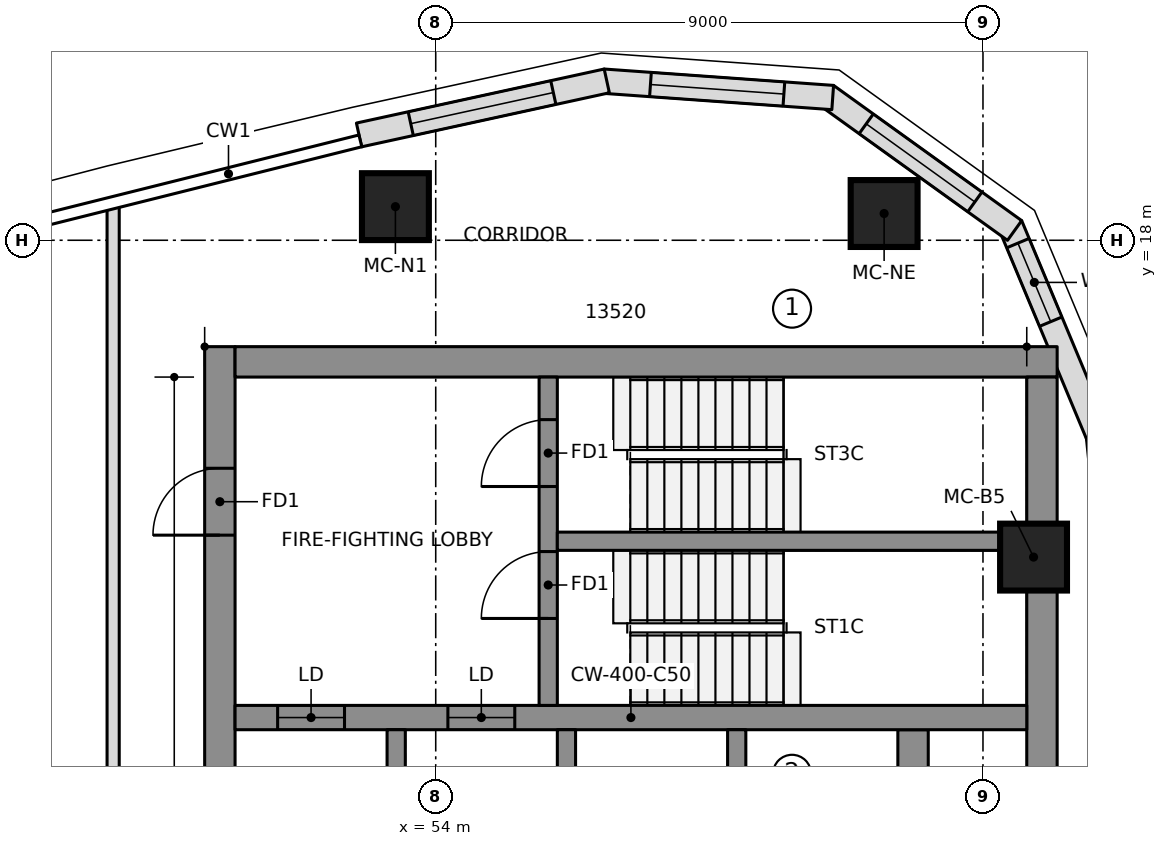
"""IFC4 building model, lengths in metres.
Left out: names, types, materials, properties, quantities, classifications, styles, units other than length and angle.
Written with IfcOpenShell. Run it as: python <this file> out.ifc"""

import sys

from ifc_helpers import new_model, si_unit, direction, frame, frame_2d, origin, origin_2d, place, context, subcontext, project, spatial, polyline, rectangle, outline, extrude, element, fill, save


model = new_model("IFC4")
c1 = context("Model", 3, precision=1e-05, world=origin(), true_north=direction((0.0, 1.0)))
c2 = subcontext(c1, "Body", "Model", "MODEL_VIEW")
j1 = project(units=[si_unit("LENGTHUNIT", "METRE"), si_unit("PLANEANGLEUNIT", "RADIAN")], contexts=[c1])
p1 = place(None, origin())
s1 = spatial("IfcSite", under=j1, at=p1, CompositionType="ELEMENT")
p2 = place(p1, origin())
s2 = spatial("IfcBuilding", under=s1, at=p2, CompositionType="ELEMENT")
p3 = place(p2, frame((0.0, 0.0, 275.0)))
s3 = spatial("IfcBuildingStorey", under=s2, at=p3, CompositionType="ELEMENT", Elevation=275.0)
p4 = place(p3, frame((50.45, 6.65, 0.0), z_axis=(0.0, 0.0, 1.0), x_axis=(0.0, 1.0, 0.0)))
e1 = element("IfcWall", 1, at=p4, inside=s3, PredefinedType="SHEAR", context=c2, shape_type="SweptSolid", body=[
    extrude(rectangle(XDim=9.6, YDim=0.5, at=frame_2d((4.8, 0.0))), origin(), (0.0, 0.0, 1.0), 3.55),
])
p5 = place(p4, frame((6.5, 0.0, 0.0)))
e2 = element("IfcOpeningElement", 2, at=p5, cuts=e1, PredefinedType="OPENING", context=c2, shape_type="SweptSolid", body=[
    extrude(rectangle(XDim=1.1, YDim=2.1, at=frame_2d((0.55, 1.05))), frame((0.0, 0.26, 0.0), z_axis=(0.0, -1.0, 0.0), x_axis=(1.0, 0.0, 0.0)), (0.0, 0.0, 1.0), 0.52),
])
p6 = place(p3, frame((50.7, 16.0, 0.0), z_axis=(0.0, 0.0, 1.0), x_axis=(1.0, 0.0, 0.0)))
e3 = element("IfcWall", 3, at=p6, inside=s3, PredefinedType="SHEAR", context=c2, shape_type="SweptSolid", body=[
    extrude(rectangle(XDim=13.52, YDim=0.5, at=frame_2d((6.76, 0.0))), origin(), (0.0, 0.0, 1.0), 3.55),
])
p7 = place(p3, frame((63.97, 6.903, 0.0), z_axis=(0.0, 0.0, 1.0), x_axis=(0.0, 1.0, 0.0)))
e4 = element("IfcWall", 4, at=p7, inside=s3, PredefinedType="SHEAR", context=c2, shape_type="SweptSolid", body=[
    extrude(rectangle(XDim=8.847, YDim=0.5, at=frame_2d((4.423, 0.0))), origin(), (0.0, 0.0, 1.0), 3.55),
])
p8 = place(p3, frame((61.85, -9.95, 0.0), z_axis=(0.0, 0.0, 1.0), x_axis=(0.0, 1.0, 0.0)))
e5 = element("IfcWall", 5, at=p8, inside=s3, PredefinedType="SHEAR", context=c2, shape_type="SweptSolid", body=[
    extrude(rectangle(XDim=19.9, YDim=0.5, at=frame_2d((9.95, 0.0))), origin(), (0.0, 0.0, 1.0), 3.55),
])
p9 = place(p3, frame((50.7, 10.15, 0.0), z_axis=(0.0, 0.0, 1.0), x_axis=(1.0, 0.0, 0.0)))
e6 = element("IfcWall", 6, at=p9, inside=s3, PredefinedType="SHEAR", context=c2, shape_type="SweptSolid", body=[
    extrude(rectangle(XDim=13.02, YDim=0.4, at=frame_2d((6.51, 0.0))), origin(), (0.0, 0.0, 1.0), 3.55),
])
p10 = place(p9, frame((0.7, 0.0, 0.0)))
e7 = element("IfcOpeningElement", 7, at=p10, cuts=e6, PredefinedType="OPENING", context=c2, shape_type="SweptSolid", body=[
    extrude(rectangle(XDim=1.1, YDim=2.1, at=frame_2d((0.55, 1.05))), frame((0.0, 0.21, 0.0), z_axis=(0.0, -1.0, 0.0), x_axis=(1.0, 0.0, 0.0)), (0.0, 0.0, 1.0), 0.42),
])
p11 = place(p9, frame((3.5, 0.0, 0.0)))
e8 = element("IfcOpeningElement", 8, at=p11, cuts=e6, PredefinedType="OPENING", context=c2, shape_type="SweptSolid", body=[
    extrude(rectangle(XDim=1.1, YDim=2.1, at=frame_2d((0.55, 1.05))), frame((0.0, 0.21, 0.0), z_axis=(0.0, -1.0, 0.0), x_axis=(1.0, 0.0, 0.0)), (0.0, 0.0, 1.0), 0.42),
])
for number, where, z_axis, x_axis in (
    (9, (53.35, 6.95, 0.0), (0.0, 0.0, 1.0), (0.0, 1.0, 0.0)),
    (10, (56.15, 6.95, 0.0), (0.0, 0.0, 1.0), (0.0, 1.0, 0.0)),
    (11, (58.95, 6.95, 0.0), (0.0, 0.0, 1.0), (0.0, 1.0, 0.0)),
):
    element("IfcWall", number, at=place(p3, frame(where, z_axis=z_axis, x_axis=x_axis)), inside=s3, PredefinedType="SHEAR", context=c2, shape_type="SweptSolid", body=[
        extrude(rectangle(XDim=3.0, YDim=0.3, at=frame_2d((1.5, 0.0))), origin(), (0.0, 0.0, 1.0), 3.55),
    ])
p12 = place(p3, frame((55.85, 10.35, 0.0), z_axis=(0.0, 0.0, 1.0), x_axis=(0.0, 1.0, 0.0)))
e12 = element("IfcWall", 12, at=p12, inside=s3, PredefinedType="SHEAR", context=c2, shape_type="SweptSolid", body=[
    extrude(rectangle(XDim=5.4, YDim=0.3, at=frame_2d((2.7, 0.0))), origin(), (0.0, 0.0, 1.0), 3.55),
])
p13 = place(p12, frame((1.43, 0.0, 0.0)))
e13 = element("IfcOpeningElement", 13, at=p13, cuts=e12, PredefinedType="OPENING", context=c2, shape_type="SweptSolid", body=[
    extrude(rectangle(XDim=1.1, YDim=2.1, at=frame_2d((0.55, 1.05))), frame((0.0, 0.16, 0.0), z_axis=(0.0, -1.0, 0.0), x_axis=(1.0, 0.0, 0.0)), (0.0, 0.0, 1.0), 0.32),
])
p14 = place(p12, frame((3.6, 0.0, 0.0)))
e14 = element("IfcOpeningElement", 14, at=p14, cuts=e12, PredefinedType="OPENING", context=c2, shape_type="SweptSolid", body=[
    extrude(rectangle(XDim=1.1, YDim=2.1, at=frame_2d((0.55, 1.05))), frame((0.0, 0.16, 0.0), z_axis=(0.0, -1.0, 0.0), x_axis=(1.0, 0.0, 0.0)), (0.0, 0.0, 1.0), 0.32),
])
p15 = place(p3, frame((56.0, 13.05, 0.0), z_axis=(0.0, 0.0, 1.0), x_axis=(1.0, 0.0, 0.0)))
e15 = element("IfcWall", 15, at=p15, inside=s3, PredefinedType="SHEAR", context=c2, shape_type="SweptSolid", body=[
    extrude(rectangle(XDim=7.72, YDim=0.3, at=frame_2d((3.86, 0.0))), origin(), (0.0, 0.0, 1.0), 3.55),
])
for number, where, z_axis, x_axis in (
    (16, (63.832, 12.789, 0.0), (0.0, 0.0, 1.0), (1.0, 0.0, 0.0)),
    (17, (61.374, 18.44, 0.0), (0.0, 0.0, 1.0), (1.0, 0.0, 0.0)),
    (18, (53.337, 18.553, 0.0), (0.0, 0.0, 1.0), (1.0, 0.0, 0.0)),
):
    element("IfcColumn", number, at=place(p3, frame(where, z_axis=z_axis, x_axis=x_axis)), inside=s3, PredefinedType="COLUMN", context=c2, shape_type="SweptSolid", body=[
        extrude(rectangle(XDim=1.1, YDim=1.1, at=origin_2d()), origin(), (0.0, 0.0, 1.0), 3.55),
    ])
p16 = place(p3, frame((65.331, 10.571, 0.0), z_axis=(0.0, 0.0, 1.0), x_axis=(-0.102249826987, 0.994758751096, 0.0)))
e19 = element("IfcWall", 19, at=p16, inside=s3, PredefinedType="NOTDEFINED", context=c2, shape_type="SweptSolid", body=[
    extrude(outline(polyline([(-0.003, -0.2), (4.263, -0.2), (4.204, 0.2), (0.003, 0.2), (-0.003, -0.2)])), origin(), (0.0, 0.0, 1.0), 3.25),
])
p17 = place(p16, frame((0.417, 0.0, 0.5)))
e20 = element("IfcOpeningElement", 20, at=p17, cuts=e19, PredefinedType="OPENING", context=c2, shape_type="SweptSolid", body=[
    extrude(rectangle(XDim=2.4, YDim=2.0, at=frame_2d((1.2, 1.0))), frame((0.0, 0.21, 0.0), z_axis=(0.0, -1.0, 0.0), x_axis=(1.0, 0.0, 0.0)), (0.0, 0.0, 1.0), 0.42),
])
p18 = place(p3, frame((64.898, 14.782, 0.0), z_axis=(0.0, 0.0, 1.0), x_axis=(-0.385285857918, 0.922797273343, 0.0)))
e21 = element("IfcWall", 21, at=p18, inside=s3, PredefinedType="NOTDEFINED", context=c2, shape_type="SweptSolid", body=[
    extrude(outline(polyline([(-0.03, -0.2), (3.753, -0.2), (3.64, 0.2), (0.03, 0.2), (-0.03, -0.2)])), origin(), (0.0, 0.0, 1.0), 3.25),
])
p19 = place(p18, frame((2.035, 0.0, 0.6)))
e22 = element("IfcOpeningElement", 22, at=p19, cuts=e21, PredefinedType="OPENING", context=c2, shape_type="SweptSolid", body=[
    extrude(outline(polyline([(0.0, 1.75), (0.053, 2.018), (0.205, 2.245), (0.432, 2.397), (0.7, 2.45), (0.968, 2.397), (1.195, 2.245), (1.347, 2.018), (1.4, 1.75), (1.4, 0.7), (1.347, 0.432), (1.195, 0.205), (0.968, 0.053), (0.7, 0.0), (0.432, 0.053), (0.205, 0.205), (0.053, 0.432), (0.0, 0.7), (0.0, 1.75)])), frame((0.0, 0.21, 0.0), z_axis=(0.0, -1.0, 0.0), x_axis=(1.0, 0.0, 0.0)), (0.0, 0.0, 1.0), 0.42),
])
p20 = place(p3, frame((63.474, 18.194, 0.0), z_axis=(0.0, 0.0, 1.0), x_axis=(-0.811962548682, 0.583709533533, 0.0)))
e23 = element("IfcWall", 23, at=p20, inside=s3, PredefinedType="NOTDEFINED", context=c2, shape_type="SweptSolid", body=[
    extrude(outline(polyline([(-0.057, -0.2), (3.753, -0.2), (3.64, 0.2), (0.057, 0.2), (-0.057, -0.2)])), origin(), (0.0, 0.0, 1.0), 3.25),
])
p21 = place(p20, frame((0.748, 0.0, 0.6)))
e24 = element("IfcOpeningElement", 24, at=p21, cuts=e23, PredefinedType="OPENING", context=c2, shape_type="SweptSolid", body=[
    extrude(outline(polyline([(0.0, 1.35), (0.084, 1.771), (0.322, 2.128), (0.679, 2.366), (1.1, 2.45), (1.521, 2.366), (1.878, 2.128), (2.116, 1.771), (2.2, 1.35), (2.2, 1.1), (2.116, 0.679), (1.878, 0.322), (1.521, 0.084), (1.1, 0.0), (0.679, 0.084), (0.322, 0.322), (0.084, 0.679), (0.0, 1.1), (0.0, 1.35)])), frame((0.0, 0.21, 0.0), z_axis=(0.0, -1.0, 0.0), x_axis=(1.0, 0.0, 0.0)), (0.0, 0.0, 1.0), 0.42),
])
p22 = place(p3, frame((60.472, 20.352, 0.0), z_axis=(0.0, 0.0, 1.0), x_axis=(-0.99746272096, 0.071190731806, 0.0)))
e25 = element("IfcWall", 25, at=p22, inside=s3, PredefinedType="NOTDEFINED", context=c2, shape_type="SweptSolid", body=[
    extrude(outline(polyline([(-0.057, -0.2), (3.726, -0.2), (3.668, 0.2), (0.057, 0.2), (-0.057, -0.2)])), origin(), (0.0, 0.0, 1.0), 3.25),
])
p23 = place(p22, frame((0.748, 0.0, 0.6)))
e26 = element("IfcOpeningElement", 26, at=p23, cuts=e25, PredefinedType="OPENING", context=c2, shape_type="SweptSolid", body=[
    extrude(outline(polyline([(0.0, 1.35), (0.084, 1.771), (0.322, 2.128), (0.679, 2.366), (1.1, 2.45), (1.521, 2.366), (1.878, 2.128), (2.116, 1.771), (2.2, 1.35), (2.2, 1.1), (2.116, 0.679), (1.878, 0.322), (1.521, 0.084), (1.1, 0.0), (0.679, 0.084), (0.322, 0.322), (0.084, 0.679), (0.0, 1.1), (0.0, 1.35)])), frame((0.0, 0.21, 0.0), z_axis=(0.0, -1.0, 0.0), x_axis=(1.0, 0.0, 0.0)), (0.0, 0.0, 1.0), 0.42),
])
p24 = place(p3, frame((56.785, 20.615, 0.0), z_axis=(0.0, 0.0, 1.0), x_axis=(-0.977020225348, -0.213146614471, 0.0)))
e27 = element("IfcWall", 27, at=p24, inside=s3, PredefinedType="NOTDEFINED", context=c2, shape_type="SweptSolid", body=[
    extrude(outline(polyline([(-0.029, -0.2), (4.142, -0.2), (4.142, 0.2), (0.029, 0.2), (-0.029, -0.2)])), origin(), (0.0, 0.0, 1.0), 3.25),
])
p25 = place(p24, frame((0.871, 0.0, 0.5)))
e28 = element("IfcOpeningElement", 28, at=p25, cuts=e27, PredefinedType="OPENING", context=c2, shape_type="SweptSolid", body=[
    extrude(rectangle(XDim=2.4, YDim=2.0, at=frame_2d((1.2, 1.0))), frame((0.0, 0.21, 0.0), z_axis=(0.0, -1.0, 0.0), x_axis=(1.0, 0.0, 0.0)), (0.0, 0.0, 1.0), 0.42),
])
p26 = place(p3, frame((48.695, 18.553, 0.0), z_axis=(0.0, 0.0, 1.0), x_axis=(0.0, -1.0, 0.0)))
e29 = element("IfcWall", 29, at=p26, inside=s3, PredefinedType="PARTITIONING", context=c2, shape_type="SweptSolid", body=[
    extrude(rectangle(XDim=9.997, YDim=0.2, at=frame_2d((4.998, 0.0))), origin(), (0.0, 0.0, 1.0), 3.25),
])
p27 = place(p19, origin())
e30 = element("IfcWindow", 30, at=p27, inside=s3, PartitioningType="SINGLE_PANEL", PredefinedType="WINDOW", context=c2, shape_type="SweptSolid", body=[
    extrude(outline(polyline([(0.0, 1.75), (0.053, 2.018), (0.205, 2.245), (0.432, 2.397), (0.7, 2.45), (0.968, 2.397), (1.195, 2.245), (1.347, 2.018), (1.4, 1.75), (1.4, 0.7), (1.347, 0.432), (1.195, 0.205), (0.968, 0.053), (0.7, 0.0), (0.432, 0.053), (0.205, 0.205), (0.053, 0.432), (0.0, 0.7), (0.0, 1.75)])), frame((0.0, 0.17, 0.0), z_axis=(0.0, -1.0, 0.0), x_axis=(1.0, 0.0, 0.0)), (0.0, 0.0, 1.0), 0.06),
])
fill(e22, e30)
p28 = place(p21, origin())
e31 = element("IfcWindow", 31, at=p28, inside=s3, PartitioningType="SINGLE_PANEL", PredefinedType="WINDOW", context=c2, shape_type="SweptSolid", body=[
    extrude(outline(polyline([(0.0, 1.35), (0.084, 1.771), (0.322, 2.128), (0.679, 2.366), (1.1, 2.45), (1.521, 2.366), (1.878, 2.128), (2.116, 1.771), (2.2, 1.35), (2.2, 1.1), (2.116, 0.679), (1.878, 0.322), (1.521, 0.084), (1.1, 0.0), (0.679, 0.084), (0.322, 0.322), (0.084, 0.679), (0.0, 1.1), (0.0, 1.35)])), frame((0.0, 0.17, 0.0), z_axis=(0.0, -1.0, 0.0), x_axis=(1.0, 0.0, 0.0)), (0.0, 0.0, 1.0), 0.06),
])
fill(e24, e31)
p29 = place(p23, origin())
e32 = element("IfcWindow", 32, at=p29, inside=s3, PartitioningType="SINGLE_PANEL", PredefinedType="WINDOW", context=c2, shape_type="SweptSolid", body=[
    extrude(outline(polyline([(0.0, 1.35), (0.084, 1.771), (0.322, 2.128), (0.679, 2.366), (1.1, 2.45), (1.521, 2.366), (1.878, 2.128), (2.116, 1.771), (2.2, 1.35), (2.2, 1.1), (2.116, 0.679), (1.878, 0.322), (1.521, 0.084), (1.1, 0.0), (0.679, 0.084), (0.322, 0.322), (0.084, 0.679), (0.0, 1.1), (0.0, 1.35)])), frame((0.0, 0.17, 0.0), z_axis=(0.0, -1.0, 0.0), x_axis=(1.0, 0.0, 0.0)), (0.0, 0.0, 1.0), 0.06),
])
fill(e26, e32)
p30 = place(p25, origin())
e33 = element("IfcWindow", 33, at=p30, inside=s3, PartitioningType="SINGLE_PANEL", PredefinedType="WINDOW", context=c2, shape_type="SweptSolid", body=[
    extrude(rectangle(XDim=2.4, YDim=2.0, at=frame_2d((1.2, 1.0))), frame((0.0, 0.17, 0.0), z_axis=(0.0, -1.0, 0.0), x_axis=(1.0, 0.0, 0.0)), (0.0, 0.0, 1.0), 0.06),
])
fill(e28, e33)
p31 = place(p10, origin())
e34 = element("IfcDoor", 34, at=p31, inside=s3, OperationType="DOUBLE_DOOR_SLIDING", PredefinedType="DOOR", context=c2, shape_type="SweptSolid", body=[
    extrude(rectangle(XDim=1.1, YDim=2.1, at=frame_2d((0.55, 1.05))), frame((0.0, 0.025, 0.0), z_axis=(0.0, -1.0, 0.0), x_axis=(1.0, 0.0, 0.0)), (0.0, 0.0, 1.0), 0.05),
])
fill(e7, e34)
p32 = place(p11, origin())
e35 = element("IfcDoor", 35, at=p32, inside=s3, OperationType="DOUBLE_DOOR_SLIDING", PredefinedType="DOOR", context=c2, shape_type="SweptSolid", body=[
    extrude(rectangle(XDim=1.1, YDim=2.1, at=frame_2d((0.55, 1.05))), frame((0.0, 0.025, 0.0), z_axis=(0.0, -1.0, 0.0), x_axis=(1.0, 0.0, 0.0)), (0.0, 0.0, 1.0), 0.05),
])
fill(e8, e35)
p33 = place(p13, origin())
e36 = element("IfcDoor", 36, at=p33, inside=s3, OperationType="SINGLE_SWING_RIGHT", PredefinedType="DOOR", context=c2, shape_type="SweptSolid", body=[
    extrude(rectangle(XDim=1.1, YDim=2.1, at=frame_2d((0.55, 1.05))), frame((0.0, 0.025, 0.0), z_axis=(0.0, -1.0, 0.0), x_axis=(1.0, 0.0, 0.0)), (0.0, 0.0, 1.0), 0.05),
])
fill(e13, e36)
p34 = place(p14, origin())
e37 = element("IfcDoor", 37, at=p34, inside=s3, OperationType="SINGLE_SWING_RIGHT", PredefinedType="DOOR", context=c2, shape_type="SweptSolid", body=[
    extrude(rectangle(XDim=1.1, YDim=2.1, at=frame_2d((0.55, 1.05))), frame((0.0, 0.025, 0.0), z_axis=(0.0, -1.0, 0.0), x_axis=(1.0, 0.0, 0.0)), (0.0, 0.0, 1.0), 0.05),
])
fill(e14, e37)
p35 = place(p5, origin())
e38 = element("IfcDoor", 38, at=p35, inside=s3, OperationType="SINGLE_SWING_RIGHT", PredefinedType="DOOR", context=c2, shape_type="SweptSolid", body=[
    extrude(rectangle(XDim=1.1, YDim=2.1, at=frame_2d((0.55, 1.05))), frame((0.0, 0.025, 0.0), z_axis=(0.0, -1.0, 0.0), x_axis=(1.0, 0.0, 0.0)), (0.0, 0.0, 1.0), 0.05),
])
fill(e2, e38)
save(model, sys.argv[1])
